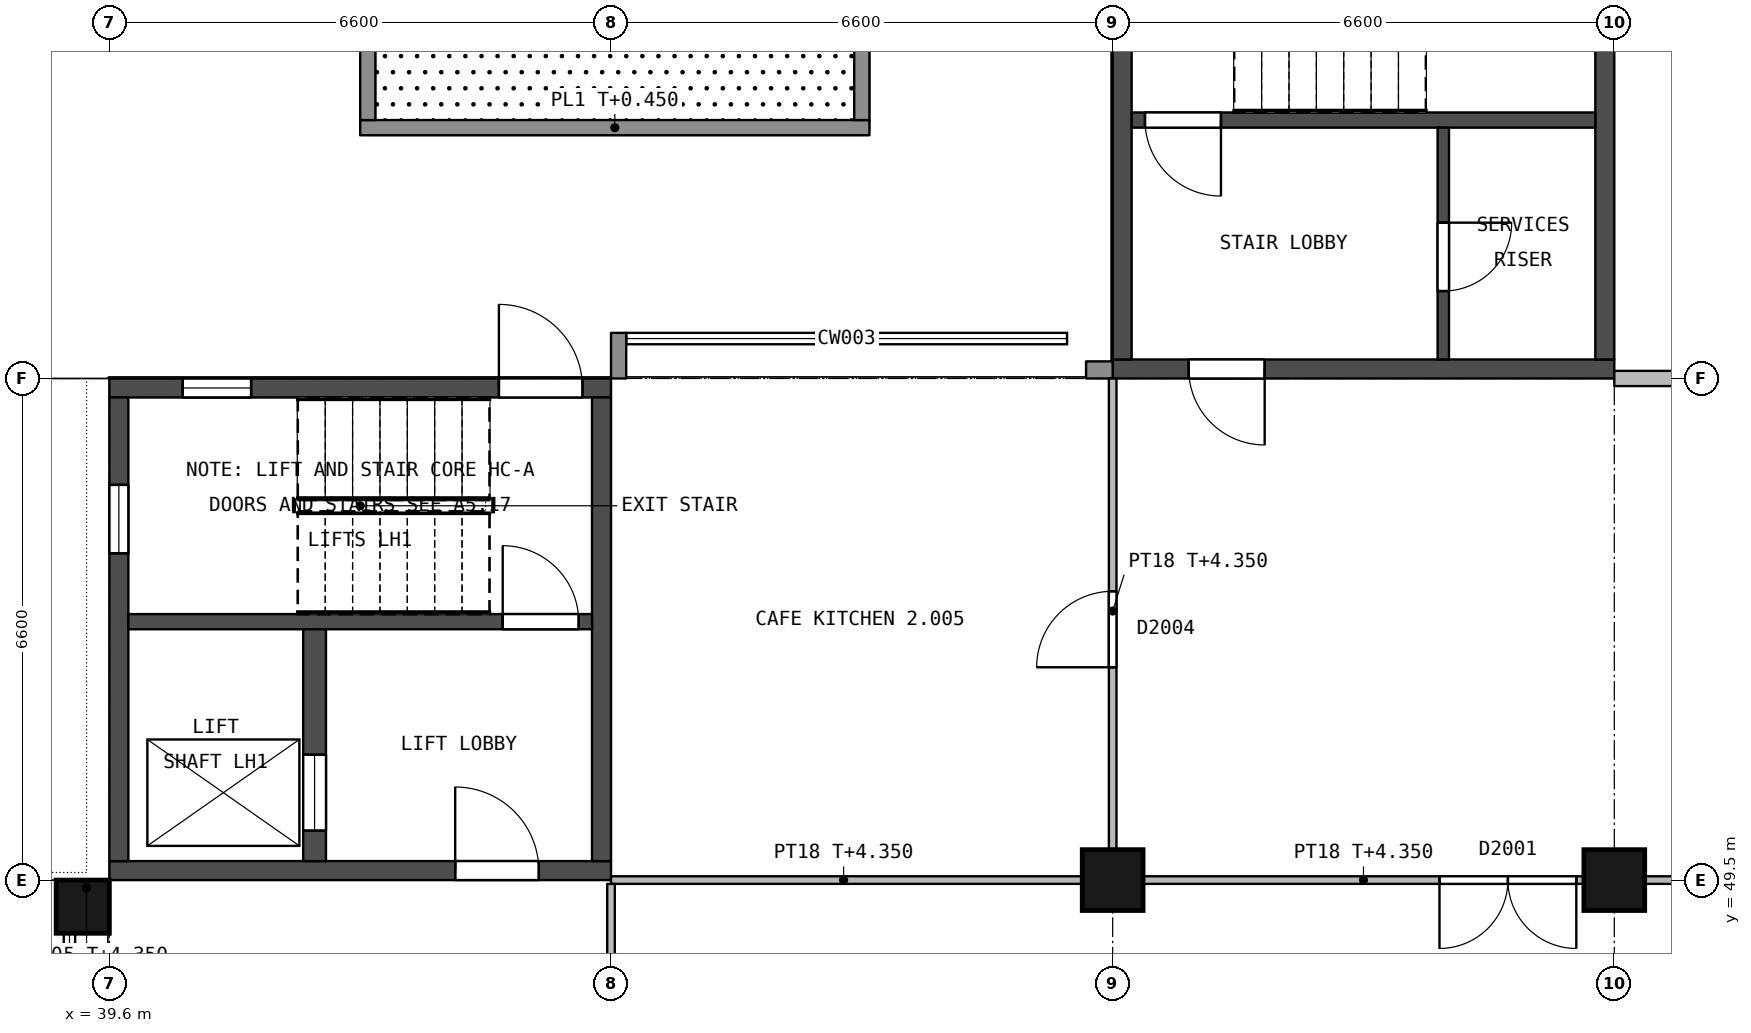
"""IFC4 building model, lengths in metres.
Left out: names, types, materials, properties, quantities, classifications, styles, units other than length and angle.
Written with IfcOpenShell. Run it as: python <this file> out.ifc"""

import sys

from ifc_helpers import new_model, si_unit, direction, frame, frame_2d, origin, origin_2d, place, context, subcontext, project, spatial, rectangle, extrude, element, fill, save


model = new_model("IFC4")
c1 = context("Model", 3, precision=1e-05, world=origin(), true_north=direction((0.0, 1.0)))
c2 = subcontext(c1, "Body", "Model", "MODEL_VIEW")
j1 = project(units=[si_unit("LENGTHUNIT", "METRE"), si_unit("PLANEANGLEUNIT", "RADIAN")], contexts=[c1])
p1 = place(None, origin())
s1 = spatial("IfcSite", under=j1, at=p1, CompositionType="ELEMENT")
p2 = place(p1, origin())
s2 = spatial("IfcBuilding", under=s1, at=p2, CompositionType="ELEMENT")
p3 = place(p2, origin())
s3 = spatial("IfcBuildingStorey", under=s2, at=p3, CompositionType="ELEMENT", Elevation=0.0)
p4 = place(p3, frame((39.25, 49.15, 0.0), z_axis=(0.0, 0.0, 1.0), x_axis=(1.0, 0.0, 0.0)))
e1 = element("IfcColumn", 1, at=p4, inside=s3, PredefinedType="COLUMN", context=c2, shape_type="SweptSolid", body=[
    extrude(rectangle(XDim=0.7, YDim=0.7, at=origin_2d()), origin(), (0.0, 0.0, 1.0), 5.4),
])
for number, where, z_axis, x_axis in (
    (2, (52.8, 49.5, 0.0), (0.0, 0.0, 1.0), (1.0, 0.0, 0.0)),
    (3, (59.4, 49.5, 0.0), (0.0, 0.0, 1.0), (1.0, 0.0, 0.0)),
):
    element("IfcColumn", number, at=place(p3, frame(where, z_axis=z_axis, x_axis=x_axis)), inside=s3, PredefinedType="COLUMN", context=c2, shape_type="SweptSolid", body=[
        extrude(rectangle(XDim=0.8, YDim=0.8, at=origin_2d()), origin(), (0.0, 0.0, 1.0), 5.4),
    ])
p5 = place(p3, frame((39.6, 49.625, 0.0), z_axis=(0.0, 0.0, 1.0), x_axis=(1.0, 0.0, 0.0)))
e4 = element("IfcWall", 4, at=p5, inside=s3, PredefinedType="SHEAR", context=c2, shape_type="SweptSolid", body=[
    extrude(rectangle(XDim=6.6, YDim=0.25, at=frame_2d((3.3, 0.0))), origin(), (0.0, 0.0, 1.0), 5.15),
])
p6 = place(p5, frame((4.55, 0.0, 0.0)))
e5 = element("IfcOpeningElement", 5, at=p6, cuts=e4, PredefinedType="OPENING", context=c2, shape_type="SweptSolid", body=[
    extrude(rectangle(XDim=1.1, YDim=2.1, at=frame_2d((0.55, 1.05))), frame((0.0, 0.135, 0.0), z_axis=(0.0, -1.0, 0.0), x_axis=(1.0, 0.0, 0.0)), (0.0, 0.0, 1.0), 0.27),
])
p7 = place(p3, frame((39.6, 55.975, 0.0), z_axis=(0.0, 0.0, 1.0), x_axis=(1.0, 0.0, 0.0)))
e6 = element("IfcWall", 6, at=p7, inside=s3, PredefinedType="SHEAR", context=c2, shape_type="SweptSolid", body=[
    extrude(rectangle(XDim=6.6, YDim=0.25, at=frame_2d((3.3, 0.0))), origin(), (0.0, 0.0, 1.0), 5.15),
])
p8 = place(p7, frame((5.125, 0.0, 0.0)))
e7 = element("IfcOpeningElement", 7, at=p8, cuts=e6, PredefinedType="OPENING", context=c2, shape_type="SweptSolid", body=[
    extrude(rectangle(XDim=1.1, YDim=2.4, at=frame_2d((0.55, 1.2))), frame((0.0, 0.135, 0.0), z_axis=(0.0, -1.0, 0.0), x_axis=(1.0, 0.0, 0.0)), (0.0, 0.0, 1.0), 0.27),
])
p9 = place(p7, frame((0.965, 0.0, 2.05)))
e8 = element("IfcOpeningElement", 8, at=p9, cuts=e6, PredefinedType="OPENING", context=c2, shape_type="SweptSolid", body=[
    extrude(rectangle(XDim=0.9, YDim=1.2, at=frame_2d((0.45, 0.6))), frame((0.0, 0.135, 0.0), z_axis=(0.0, -1.0, 0.0), x_axis=(1.0, 0.0, 0.0)), (0.0, 0.0, 1.0), 0.27),
])
p10 = place(p3, frame((46.075, 49.75, 0.0), z_axis=(0.0, 0.0, 1.0), x_axis=(0.0, 1.0, 0.0)))
e9 = element("IfcWall", 9, at=p10, inside=s3, PredefinedType="SHEAR", context=c2, shape_type="SweptSolid", body=[
    extrude(rectangle(XDim=6.1, YDim=0.25, at=frame_2d((3.05, 0.0))), origin(), (0.0, 0.0, 1.0), 5.15),
])
p11 = place(p3, frame((39.725, 49.75, 0.0), z_axis=(0.0, 0.0, 1.0), x_axis=(0.0, 1.0, 0.0)))
e10 = element("IfcWall", 10, at=p11, inside=s3, PredefinedType="SHEAR", context=c2, shape_type="SweptSolid", body=[
    extrude(rectangle(XDim=6.1, YDim=0.25, at=frame_2d((3.05, 0.0))), origin(), (0.0, 0.0, 1.0), 5.15),
])
p12 = place(p11, frame((4.05, 0.0, 2.05)))
e11 = element("IfcOpeningElement", 11, at=p12, cuts=e10, PredefinedType="OPENING", context=c2, shape_type="SweptSolid", body=[
    extrude(rectangle(XDim=0.9, YDim=1.2, at=frame_2d((0.45, 0.6))), frame((0.0, 0.135, 0.0), z_axis=(0.0, -1.0, 0.0), x_axis=(1.0, 0.0, 0.0)), (0.0, 0.0, 1.0), 0.27),
])
p13 = place(p3, frame((39.85, 52.9, 0.0), z_axis=(0.0, 0.0, 1.0), x_axis=(1.0, 0.0, 0.0)))
e12 = element("IfcWall", 12, at=p13, inside=s3, PredefinedType="SHEAR", context=c2, shape_type="SweptSolid", body=[
    extrude(rectangle(XDim=6.1, YDim=0.2, at=frame_2d((3.05, 0.0))), origin(), (0.0, 0.0, 1.0), 5.15),
])
p14 = place(p13, frame((4.925, 0.0, 0.0)))
e13 = element("IfcOpeningElement", 13, at=p14, cuts=e12, PredefinedType="OPENING", context=c2, shape_type="SweptSolid", body=[
    extrude(rectangle(XDim=1.0, YDim=2.1, at=frame_2d((0.5, 1.05))), frame((0.0, 0.11, 0.0), z_axis=(0.0, -1.0, 0.0), x_axis=(1.0, 0.0, 0.0)), (0.0, 0.0, 1.0), 0.22),
])
p15 = place(p3, frame((42.3, 49.75, 0.0), z_axis=(0.0, 0.0, 1.0), x_axis=(0.0, 1.0, 0.0)))
e14 = element("IfcWall", 14, at=p15, inside=s3, PredefinedType="SHEAR", context=c2, shape_type="SweptSolid", body=[
    extrude(rectangle(XDim=3.05, YDim=0.3, at=frame_2d((1.525, 0.0))), origin(), (0.0, 0.0, 1.0), 5.15),
])
p16 = place(p15, frame((0.4, 0.0, 0.0)))
e15 = element("IfcOpeningElement", 15, at=p16, cuts=e14, PredefinedType="OPENING", context=c2, shape_type="SweptSolid", body=[
    extrude(rectangle(XDim=1.0, YDim=2.1, at=frame_2d((0.5, 1.05))), frame((0.0, 0.16, 0.0), z_axis=(0.0, -1.0, 0.0), x_axis=(1.0, 0.0, 0.0)), (0.0, 0.0, 1.0), 0.32),
])
p17 = place(p3, frame((52.8, 56.225, 0.0), z_axis=(0.0, 0.0, 1.0), x_axis=(1.0, 0.0, 0.0)))
e16 = element("IfcWall", 16, at=p17, inside=s3, PredefinedType="SHEAR", context=c2, shape_type="SweptSolid", body=[
    extrude(rectangle(XDim=6.6, YDim=0.25, at=frame_2d((3.3, 0.0))), origin(), (0.0, 0.0, 1.0), 5.15),
])
p18 = place(p17, frame((1.0, 0.0, 0.0)))
e17 = element("IfcOpeningElement", 17, at=p18, cuts=e16, PredefinedType="OPENING", context=c2, shape_type="SweptSolid", body=[
    extrude(rectangle(XDim=1.0, YDim=2.1, at=frame_2d((0.5, 1.05))), frame((0.0, 0.135, 0.0), z_axis=(0.0, -1.0, 0.0), x_axis=(1.0, 0.0, 0.0)), (0.0, 0.0, 1.0), 0.27),
])
p19 = place(p3, frame((52.925, 56.35, 0.0), z_axis=(0.0, 0.0, 1.0), x_axis=(0.0, 1.0, 0.0)))
e18 = element("IfcWall", 18, at=p19, inside=s3, PredefinedType="SHEAR", context=c2, shape_type="SweptSolid", body=[
    extrude(rectangle(XDim=6.1, YDim=0.25, at=frame_2d((3.05, 0.0))), origin(), (0.0, 0.0, 1.0), 5.15),
])
p20 = place(p19, frame((4.125, 0.0, 0.0)))
e19 = element("IfcOpeningElement", 19, at=p20, cuts=e18, PredefinedType="OPENING", context=c2, shape_type="SweptSolid", body=[
    extrude(rectangle(XDim=1.1, YDim=2.4, at=frame_2d((0.55, 1.2))), frame((0.0, 0.135, 0.0), z_axis=(0.0, -1.0, 0.0), x_axis=(1.0, 0.0, 0.0)), (0.0, 0.0, 1.0), 0.27),
])
p21 = place(p3, frame((59.275, 56.35, 0.0), z_axis=(0.0, 0.0, 1.0), x_axis=(0.0, 1.0, 0.0)))
e20 = element("IfcWall", 20, at=p21, inside=s3, PredefinedType="SHEAR", context=c2, shape_type="SweptSolid", body=[
    extrude(rectangle(XDim=6.1, YDim=0.25, at=frame_2d((3.05, 0.0))), origin(), (0.0, 0.0, 1.0), 5.15),
])
p22 = place(p3, frame((53.05, 59.5, 0.0), z_axis=(0.0, 0.0, 1.0), x_axis=(1.0, 0.0, 0.0)))
e21 = element("IfcWall", 21, at=p22, inside=s3, PredefinedType="SHEAR", context=c2, shape_type="SweptSolid", body=[
    extrude(rectangle(XDim=6.1, YDim=0.2, at=frame_2d((3.05, 0.0))), origin(), (0.0, 0.0, 1.0), 5.15),
])
p23 = place(p22, frame((0.175, 0.0, 0.0)))
e22 = element("IfcOpeningElement", 22, at=p23, cuts=e21, PredefinedType="OPENING", context=c2, shape_type="SweptSolid", body=[
    extrude(rectangle(XDim=1.0, YDim=2.1, at=frame_2d((0.5, 1.05))), frame((0.0, 0.11, 0.0), z_axis=(0.0, -1.0, 0.0), x_axis=(1.0, 0.0, 0.0)), (0.0, 0.0, 1.0), 0.22),
])
p24 = place(p3, frame((57.15, 56.35, 0.0), z_axis=(0.0, 0.0, 1.0), x_axis=(0.0, 1.0, 0.0)))
e23 = element("IfcWall", 23, at=p24, inside=s3, PredefinedType="SHEAR", context=c2, shape_type="SweptSolid", body=[
    extrude(rectangle(XDim=3.05, YDim=0.15, at=frame_2d((1.525, 0.0))), origin(), (0.0, 0.0, 1.0), 5.15),
])
p25 = place(p24, frame((0.9, 0.0, 0.0)))
e24 = element("IfcOpeningElement", 24, at=p25, cuts=e23, PredefinedType="OPENING", context=c2, shape_type="SweptSolid", body=[
    extrude(rectangle(XDim=0.9, YDim=2.1, at=frame_2d((0.45, 1.05))), frame((0.0, 0.085, 0.0), z_axis=(0.0, -1.0, 0.0), x_axis=(1.0, 0.0, 0.0)), (0.0, 0.0, 1.0), 0.17),
])
p26 = place(p3, frame((52.625, 56.1, 0.0), z_axis=(0.0, 0.0, 1.0), x_axis=(0.0, 1.0, 0.0)))
e25 = element("IfcWall", 25, at=p26, inside=s3, PredefinedType="STANDARD", context=c2, shape_type="SweptSolid", body=[
    extrude(rectangle(XDim=0.225, YDim=0.35, at=frame_2d((0.112, 0.0))), origin(), (0.0, 0.0, 1.0), 4.35),
])
p27 = place(p3, frame((46.3, 56.1, 0.0), z_axis=(0.0, 0.0, 1.0), x_axis=(0.0, 1.0, 0.0)))
e26 = element("IfcWall", 26, at=p27, inside=s3, PredefinedType="STANDARD", context=c2, shape_type="SweptSolid", body=[
    extrude(rectangle(XDim=0.6, YDim=0.2, at=frame_2d((0.3, 0.0))), origin(), (0.0, 0.0, 1.0), 4.35),
])
p28 = place(p3, frame((39.6, 49.4, 0.0), z_axis=(0.0, 0.0, 1.0), x_axis=(-1.0, 0.0, 0.0)))
e27 = element("IfcWall", 27, at=p28, inside=s3, PredefinedType="STANDARD", context=c2, shape_type="SweptSolid", body=[
    extrude(rectangle(XDim=0.6, YDim=0.2, at=frame_2d((0.3, 0.0))), origin(), (0.0, 0.0, 1.0), 4.35),
])
p29 = place(p3, frame((46.2, 49.5, 0.0), z_axis=(0.0, 0.0, 1.0), x_axis=(1.0, 0.0, 0.0)))
e28 = element("IfcWall", 28, at=p29, inside=s3, PredefinedType="PARTITIONING", context=c2, shape_type="SweptSolid", body=[
    extrude(rectangle(XDim=6.2, YDim=0.1, at=frame_2d((3.1, 0.0))), origin(), (0.0, 0.0, 1.0), 4.35),
])
p30 = place(p3, frame((59.0, 49.5, 0.0), z_axis=(0.0, 0.0, 1.0), x_axis=(-1.0, 0.0, 0.0)))
e29 = element("IfcWall", 29, at=p30, inside=s3, PredefinedType="PARTITIONING", context=c2, shape_type="SweptSolid", body=[
    extrude(rectangle(XDim=5.8, YDim=0.1, at=frame_2d((2.9, 0.0))), origin(), (0.0, 0.0, 1.0), 4.35),
])
p31 = place(p30, frame((0.1, 0.0, 0.0)))
e30 = element("IfcOpeningElement", 30, at=p31, cuts=e29, PredefinedType="OPENING", context=c2, shape_type="SweptSolid", body=[
    extrude(rectangle(XDim=1.8, YDim=2.4, at=frame_2d((0.9, 1.2))), frame((0.0, 0.06, 0.0), z_axis=(0.0, -1.0, 0.0), x_axis=(1.0, 0.0, 0.0)), (0.0, 0.0, 1.0), 0.12),
])
p32 = place(p3, frame((59.8, 49.5, 0.0), z_axis=(0.0, 0.0, 1.0), x_axis=(1.0, 0.0, 0.0)))
e31 = element("IfcWall", 31, at=p32, inside=s3, PredefinedType="PARTITIONING", context=c2, shape_type="SweptSolid", body=[
    extrude(rectangle(XDim=5.8, YDim=0.1, at=frame_2d((2.9, 0.0))), origin(), (0.0, 0.0, 1.0), 4.35),
])
p33 = place(p3, frame((46.2, 42.9, 0.0), z_axis=(0.0, 0.0, 1.0), x_axis=(0.0, 1.0, 0.0)))
e32 = element("IfcWall", 32, at=p33, inside=s3, PredefinedType="PARTITIONING", context=c2, shape_type="SweptSolid", body=[
    extrude(rectangle(XDim=6.55, YDim=0.1, at=frame_2d((3.275, 0.0))), origin(), (0.0, 0.0, 1.0), 4.35),
])
p34 = place(p33, frame((2.55, 0.0, 0.0)))
e33 = element("IfcOpeningElement", 33, at=p34, cuts=e32, PredefinedType="OPENING", context=c2, shape_type="SweptSolid", body=[
    extrude(rectangle(XDim=1.5, YDim=2.4, at=frame_2d((0.75, 1.2))), frame((0.0, 0.06, 0.0), z_axis=(0.0, -1.0, 0.0), x_axis=(1.0, 0.0, 0.0)), (0.0, 0.0, 1.0), 0.12),
])
p35 = place(p3, frame((52.8, 49.9, 0.0), z_axis=(0.0, 0.0, 1.0), x_axis=(0.0, 1.0, 0.0)))
e34 = element("IfcWall", 34, at=p35, inside=s3, PredefinedType="PARTITIONING", context=c2, shape_type="SweptSolid", body=[
    extrude(rectangle(XDim=6.2, YDim=0.1, at=frame_2d((3.1, 0.0))), origin(), (0.0, 0.0, 1.0), 4.35),
])
p36 = place(p35, frame((2.4, 0.0, 0.0)))
e35 = element("IfcOpeningElement", 35, at=p36, cuts=e34, PredefinedType="OPENING", context=c2, shape_type="SweptSolid", body=[
    extrude(rectangle(XDim=1.0, YDim=2.1, at=frame_2d((0.5, 1.05))), frame((0.0, 0.06, 0.0), z_axis=(0.0, -1.0, 0.0), x_axis=(1.0, 0.0, 0.0)), (0.0, 0.0, 1.0), 0.12),
])
p37 = place(p3, frame((59.4, 56.1, 0.0), z_axis=(0.0, 0.0, 1.0), x_axis=(1.0, 0.0, 0.0)))
e36 = element("IfcWall", 36, at=p37, inside=s3, PredefinedType="PARTITIONING", context=c2, shape_type="SweptSolid", body=[
    extrude(rectangle(XDim=6.2, YDim=0.2, at=frame_2d((3.1, 0.0))), origin(), (0.0, 0.0, 1.0), 4.35),
])
p38 = place(p3, frame((42.9, 59.4, 0.0), z_axis=(0.0, 0.0, 1.0), x_axis=(1.0, 0.0, 0.0)))
e37 = element("IfcWall", 37, at=p38, inside=s3, PredefinedType="PARTITIONING", context=c2, shape_type="SweptSolid", body=[
    extrude(rectangle(XDim=6.7, YDim=0.2, at=frame_2d((3.35, 0.0))), origin(), (0.0, 0.0, 1.0), 0.45),
])
for number, where, z_axis, x_axis in (
    (38, (43.0, 59.5, 0.0), (0.0, 0.0, 1.0), (0.0, 1.0, 0.0)),
    (39, (49.5, 59.5, 0.0), (0.0, 0.0, 1.0), (0.0, 1.0, 0.0)),
):
    element("IfcWall", number, at=place(p3, frame(where, z_axis=z_axis, x_axis=x_axis)), inside=s3, PredefinedType="PARTITIONING", context=c2, shape_type="SweptSolid", body=[
        extrude(rectangle(XDim=5.4, YDim=0.2, at=frame_2d((2.7, 0.0))), origin(), (0.0, 0.0, 1.0), 0.45),
    ])
p39 = place(p6, origin())
e40 = element("IfcDoor", 40, at=p39, inside=s3, OperationType="SINGLE_SWING_LEFT", PredefinedType="DOOR", context=c2, shape_type="SweptSolid", body=[
    extrude(rectangle(XDim=1.1, YDim=2.1, at=frame_2d((0.55, 1.05))), frame((0.0, 0.025, 0.0), z_axis=(0.0, -1.0, 0.0), x_axis=(1.0, 0.0, 0.0)), (0.0, 0.0, 1.0), 0.05),
])
fill(e5, e40)
p40 = place(p14, origin())
e41 = element("IfcDoor", 41, at=p40, inside=s3, OperationType="SINGLE_SWING_LEFT", PredefinedType="DOOR", context=c2, shape_type="SweptSolid", body=[
    extrude(rectangle(XDim=1.0, YDim=2.1, at=frame_2d((0.5, 1.05))), frame((0.0, 0.025, 0.0), z_axis=(0.0, -1.0, 0.0), x_axis=(1.0, 0.0, 0.0)), (0.0, 0.0, 1.0), 0.05),
])
fill(e13, e41)
p41 = place(p8, origin())
e42 = element("IfcDoor", 42, at=p41, inside=s3, OperationType="SINGLE_SWING_LEFT", PredefinedType="DOOR", context=c2, shape_type="SweptSolid", body=[
    extrude(rectangle(XDim=1.1, YDim=2.4, at=frame_2d((0.55, 1.2))), frame((0.0, 0.025, 0.0), z_axis=(0.0, -1.0, 0.0), x_axis=(1.0, 0.0, 0.0)), (0.0, 0.0, 1.0), 0.05),
])
fill(e7, e42)
p42 = place(p16, origin())
e43 = element("IfcDoor", 43, at=p42, inside=s3, OperationType="DOUBLE_DOOR_SLIDING", PredefinedType="NOTDEFINED", context=c2, shape_type="SweptSolid", body=[
    extrude(rectangle(XDim=1.0, YDim=2.1, at=frame_2d((0.5, 1.05))), frame((0.0, 0.025, 0.0), z_axis=(0.0, -1.0, 0.0), x_axis=(1.0, 0.0, 0.0)), (0.0, 0.0, 1.0), 0.05),
])
fill(e15, e43)
p43 = place(p9, origin())
e44 = element("IfcWindow", 44, at=p43, inside=s3, PartitioningType="SINGLE_PANEL", PredefinedType="WINDOW", context=c2, shape_type="SweptSolid", body=[
    extrude(rectangle(XDim=0.9, YDim=1.2, at=frame_2d((0.45, 0.6))), frame((0.0, 0.03, 0.0), z_axis=(0.0, -1.0, 0.0), x_axis=(1.0, 0.0, 0.0)), (0.0, 0.0, 1.0), 0.06),
])
fill(e8, e44)
p44 = place(p12, origin())
e45 = element("IfcWindow", 45, at=p44, inside=s3, PartitioningType="SINGLE_PANEL", PredefinedType="WINDOW", context=c2, shape_type="SweptSolid", body=[
    extrude(rectangle(XDim=0.9, YDim=1.2, at=frame_2d((0.45, 0.6))), frame((0.0, 0.03, 0.0), z_axis=(0.0, -1.0, 0.0), x_axis=(1.0, 0.0, 0.0)), (0.0, 0.0, 1.0), 0.06),
])
fill(e11, e45)
p45 = place(p25, origin())
e46 = element("IfcDoor", 46, at=p45, inside=s3, OperationType="SINGLE_SWING_RIGHT", PredefinedType="DOOR", context=c2, shape_type="SweptSolid", body=[
    extrude(rectangle(XDim=0.9, YDim=2.1, at=frame_2d((0.45, 1.05))), frame((0.0, 0.025, 0.0), z_axis=(0.0, -1.0, 0.0), x_axis=(1.0, 0.0, 0.0)), (0.0, 0.0, 1.0), 0.05),
])
fill(e24, e46)
p46 = place(p18, origin())
e47 = element("IfcDoor", 47, at=p46, inside=s3, OperationType="SINGLE_SWING_RIGHT", PredefinedType="DOOR", context=c2, shape_type="SweptSolid", body=[
    extrude(rectangle(XDim=1.0, YDim=2.1, at=frame_2d((0.5, 1.05))), frame((0.0, 0.025, 0.0), z_axis=(0.0, -1.0, 0.0), x_axis=(1.0, 0.0, 0.0)), (0.0, 0.0, 1.0), 0.05),
])
fill(e17, e47)
p47 = place(p23, origin())
e48 = element("IfcDoor", 48, at=p47, inside=s3, OperationType="SINGLE_SWING_RIGHT", PredefinedType="DOOR", context=c2, shape_type="SweptSolid", body=[
    extrude(rectangle(XDim=1.0, YDim=2.1, at=frame_2d((0.5, 1.05))), frame((0.0, 0.025, 0.0), z_axis=(0.0, -1.0, 0.0), x_axis=(1.0, 0.0, 0.0)), (0.0, 0.0, 1.0), 0.05),
])
fill(e22, e48)
p48 = place(p31, origin())
e49 = element("IfcDoor", 49, at=p48, inside=s3, OperationType="DOUBLE_DOOR_SINGLE_SWING", PredefinedType="DOOR", context=c2, shape_type="SweptSolid", body=[
    extrude(rectangle(XDim=1.8, YDim=2.4, at=frame_2d((0.9, 1.2))), frame((0.0, 0.025, 0.0), z_axis=(0.0, -1.0, 0.0), x_axis=(1.0, 0.0, 0.0)), (0.0, 0.0, 1.0), 0.05),
])
fill(e30, e49)
p49 = place(p36, origin())
e50 = element("IfcDoor", 50, at=p49, inside=s3, OperationType="SINGLE_SWING_LEFT", PredefinedType="DOOR", context=c2, shape_type="SweptSolid", body=[
    extrude(rectangle(XDim=1.0, YDim=2.1, at=frame_2d((0.5, 1.05))), frame((0.0, 0.025, 0.0), z_axis=(0.0, -1.0, 0.0), x_axis=(1.0, 0.0, 0.0)), (0.0, 0.0, 1.0), 0.05),
])
fill(e35, e50)
save(model, sys.argv[1])
